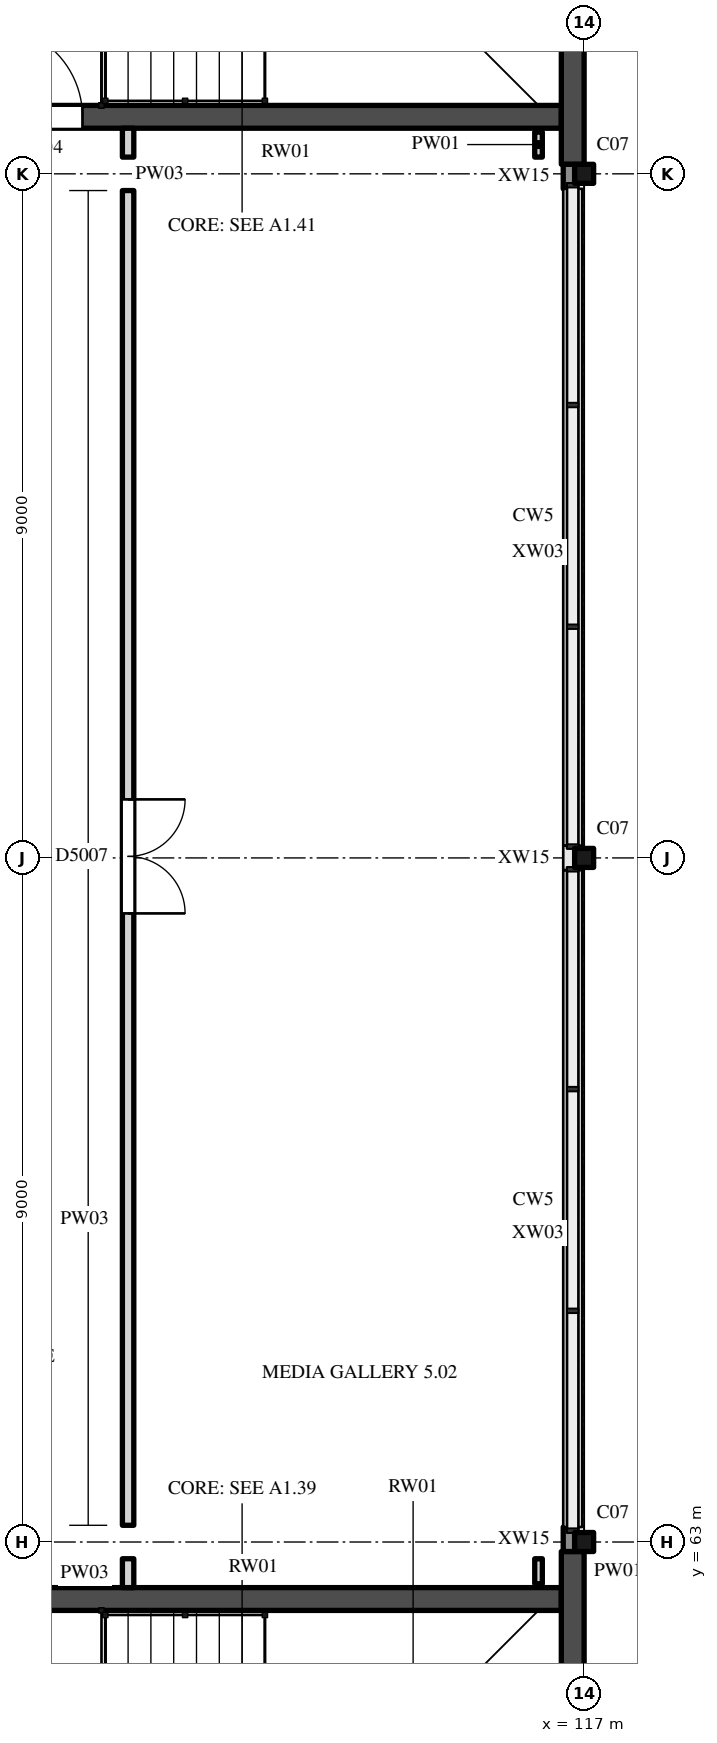
"""IFC4 building model, lengths in metres.
Left out: names, types, materials, properties, quantities, classifications, styles, units other than length and angle.
Written with IfcOpenShell. Run it as: python <this file> out.ifc"""

import sys

from ifc_helpers import new_model, si_unit, direction, frame, frame_2d, origin, origin_2d, place, context, subcontext, project, spatial, rectangle, hollow_rectangle, extrude, element, fill, save


model = new_model("IFC4")
c1 = context("Model", 3, precision=1e-05, world=origin(), true_north=direction((0.0, 1.0)))
c2 = subcontext(c1, "Body", "Model", "MODEL_VIEW")
j1 = project(units=[si_unit("LENGTHUNIT", "METRE"), si_unit("PLANEANGLEUNIT", "RADIAN")], contexts=[c1])
p1 = place(None, origin())
s1 = spatial("IfcSite", under=j1, at=p1, CompositionType="ELEMENT")
p2 = place(p1, origin())
s2 = spatial("IfcBuilding", under=s1, at=p2, CompositionType="ELEMENT")
p3 = place(p2, frame((0.0, 0.0, 31.0)))
s3 = spatial("IfcBuildingStorey", under=s2, at=p3, CompositionType="ELEMENT", Elevation=31.0)
for number, where, z_axis, x_axis in (
    (1, (117.0, 63.0, 0.0), (0.0, 0.0, 1.0), (1.0, 0.0, 0.0)),
    (2, (117.0, 72.0, 0.0), (0.0, 0.0, 1.0), (1.0, 0.0, 0.0)),
    (3, (117.0, 81.0, 0.0), (0.0, 0.0, 1.0), (1.0, 0.0, 0.0)),
):
    element("IfcColumn", number, at=place(p3, frame(where, z_axis=z_axis, x_axis=x_axis)), inside=s3, PredefinedType="COLUMN", context=c2, shape_type="SweptSolid", body=[
        extrude(hollow_rectangle(XDim=0.25, YDim=0.25, WallThickness=0.009, InnerFilletRadius=0.013, OuterFilletRadius=0.022, at=origin_2d()), origin(), (0.0, 0.0, 1.0), 5.0),
    ])
p4 = place(p3, frame((108.6, 62.25, 0.0), z_axis=(0.0, 0.0, 1.0), x_axis=(1.0, 0.0, 0.0)))
e4 = element("IfcWall", 4, at=p4, inside=s3, PredefinedType="SHEAR", context=c2, shape_type="SweptSolid", body=[
    extrude(rectangle(XDim=8.1, YDim=0.3, at=frame_2d((4.05, 0.0))), origin(), (0.0, 0.0, 1.0), 5.0),
])
p5 = place(p3, frame((116.85, 54.125, 0.0), z_axis=(0.0, 0.0, 1.0), x_axis=(0.0, 1.0, 0.0)))
e5 = element("IfcWall", 5, at=p5, inside=s3, PredefinedType="SHEAR", context=c2, shape_type="SweptSolid", body=[
    extrude(rectangle(XDim=8.75, YDim=0.3, at=frame_2d((4.375, 0.0))), origin(), (0.0, 0.0, 1.0), 5.0),
])
p6 = place(p3, frame((108.6, 81.75, 0.0), z_axis=(0.0, 0.0, 1.0), x_axis=(1.0, 0.0, 0.0)))
e6 = element("IfcWall", 6, at=p6, inside=s3, PredefinedType="SHEAR", context=c2, shape_type="SweptSolid", body=[
    extrude(rectangle(XDim=8.1, YDim=0.3, at=frame_2d((4.05, 0.0))), origin(), (0.0, 0.0, 1.0), 5.0),
])
p7 = place(p6, frame((0.6, 0.0, 0.0)))
e7 = element("IfcOpeningElement", 7, at=p7, cuts=e6, PredefinedType="OPENING", context=c2, shape_type="SweptSolid", body=[
    extrude(rectangle(XDim=1.2, YDim=2.1, at=frame_2d((0.6, 1.05))), frame((0.0, 0.16, 0.0), z_axis=(0.0, -1.0, 0.0), x_axis=(1.0, 0.0, 0.0)), (0.0, 0.0, 1.0), 0.32),
])
p8 = place(p3, frame((116.85, 81.125, 0.0), z_axis=(0.0, 0.0, 1.0), x_axis=(0.0, 1.0, 0.0)))
e8 = element("IfcWall", 8, at=p8, inside=s3, PredefinedType="SHEAR", context=c2, shape_type="SweptSolid", body=[
    extrude(rectangle(XDim=8.711, YDim=0.3, at=frame_2d((4.356, 0.0))), origin(), (0.0, 0.0, 1.0), 5.0),
])
for number, where, z_axis, x_axis in (
    (9, (116.85, 63.197, 0.0), (0.0, 0.0, 1.0), (0.0, 1.0, 0.0)),
    (10, (116.85, 72.161, 0.0), (0.0, 0.0, 1.0), (0.0, 1.0, 0.0)),
):
    element("IfcWall", number, at=place(p3, frame(where, z_axis=z_axis, x_axis=x_axis)), inside=s3, PredefinedType="SOLIDWALL", context=c2, shape_type="SweptSolid", body=[
        extrude(rectangle(XDim=8.642, YDim=0.25, at=frame_2d((4.321, 0.0))), origin(), (0.0, 0.0, 1.0), 1.1),
    ])
p9 = place(p3, frame((116.8, 62.875, 0.0), z_axis=(0.0, 0.0, 1.0), x_axis=(0.0, 1.0, 0.0)))
e11 = element("IfcWall", 11, at=p9, inside=s3, PredefinedType="SOLIDWALL", context=c2, shape_type="SweptSolid", body=[
    extrude(rectangle(XDim=0.322, YDim=0.15, at=frame_2d((0.161, 0.0))), origin(), (0.0, 0.0, 1.0), 5.0),
])
p10 = place(p3, frame((116.8, 71.839, 0.0), z_axis=(0.0, 0.0, 1.0), x_axis=(0.0, 1.0, 0.0)))
e12 = element("IfcWall", 12, at=p10, inside=s3, PredefinedType="SOLIDWALL", context=c2, shape_type="SweptSolid", body=[
    extrude(rectangle(XDim=0.322, YDim=0.15, at=frame_2d((0.161, 0.0))), origin(), (0.0, 0.0, 1.0), 1.1),
])
p11 = place(p3, frame((116.8, 80.803, 0.0), z_axis=(0.0, 0.0, 1.0), x_axis=(0.0, 1.0, 0.0)))
e13 = element("IfcWall", 13, at=p11, inside=s3, PredefinedType="SOLIDWALL", context=c2, shape_type="SweptSolid", body=[
    extrude(rectangle(XDim=0.322, YDim=0.15, at=frame_2d((0.161, 0.0))), origin(), (0.0, 0.0, 1.0), 5.0),
])
p12 = place(p2, frame((0.0, 0.0, 16.0)))
s4 = spatial("IfcBuildingStorey", under=s2, at=p12, CompositionType="ELEMENT", Elevation=16.0)
p13 = place(p12, frame((117.15, 63.0, 16.0), z_axis=(0.0, 0.0, 1.0), x_axis=(1.0, 0.0, 0.0)))
e14 = element("IfcWall", 14, at=p13, inside=s4, PredefinedType="SOLIDWALL", context=c2, shape_type="SweptSolid", body=[
    extrude(rectangle(XDim=53.7, YDim=0.3, at=frame_2d((26.85, 0.0))), origin(), (0.0, 0.0, 1.0), 0.9),
])
p14 = place(p13, frame((0.15, 0.0, 0.15)))
e15 = element("IfcOpeningElement", 15, at=p14, cuts=e14, PredefinedType="OPENING", context=c2, shape_type="SweptSolid", body=[
    extrude(rectangle(XDim=2.4, YDim=0.6, at=frame_2d((1.2, 0.3))), frame((0.0, 0.16, 0.0), z_axis=(0.0, -1.0, 0.0), x_axis=(1.0, 0.0, 0.0)), (0.0, 0.0, 1.0), 0.32),
])
p15 = place(p13, frame((3.15, 0.0, 0.15)))
e16 = element("IfcOpeningElement", 16, at=p15, cuts=e14, PredefinedType="OPENING", context=c2, shape_type="SweptSolid", body=[
    extrude(rectangle(XDim=2.4, YDim=0.6, at=frame_2d((1.2, 0.3))), frame((0.0, 0.16, 0.0), z_axis=(0.0, -1.0, 0.0), x_axis=(1.0, 0.0, 0.0)), (0.0, 0.0, 1.0), 0.32),
])
p16 = place(p13, frame((6.15, 0.0, 0.15)))
e17 = element("IfcOpeningElement", 17, at=p16, cuts=e14, PredefinedType="OPENING", context=c2, shape_type="SweptSolid", body=[
    extrude(rectangle(XDim=2.4, YDim=0.6, at=frame_2d((1.2, 0.3))), frame((0.0, 0.16, 0.0), z_axis=(0.0, -1.0, 0.0), x_axis=(1.0, 0.0, 0.0)), (0.0, 0.0, 1.0), 0.32),
])
p17 = place(p13, frame((9.15, 0.0, 0.15)))
e18 = element("IfcOpeningElement", 18, at=p17, cuts=e14, PredefinedType="OPENING", context=c2, shape_type="SweptSolid", body=[
    extrude(rectangle(XDim=2.4, YDim=0.6, at=frame_2d((1.2, 0.3))), frame((0.0, 0.16, 0.0), z_axis=(0.0, -1.0, 0.0), x_axis=(1.0, 0.0, 0.0)), (0.0, 0.0, 1.0), 0.32),
])
p18 = place(p13, frame((12.15, 0.0, 0.15)))
e19 = element("IfcOpeningElement", 19, at=p18, cuts=e14, PredefinedType="OPENING", context=c2, shape_type="SweptSolid", body=[
    extrude(rectangle(XDim=2.4, YDim=0.6, at=frame_2d((1.2, 0.3))), frame((0.0, 0.16, 0.0), z_axis=(0.0, -1.0, 0.0), x_axis=(1.0, 0.0, 0.0)), (0.0, 0.0, 1.0), 0.32),
])
p19 = place(p13, frame((15.15, 0.0, 0.15)))
e20 = element("IfcOpeningElement", 20, at=p19, cuts=e14, PredefinedType="OPENING", context=c2, shape_type="SweptSolid", body=[
    extrude(rectangle(XDim=2.4, YDim=0.6, at=frame_2d((1.2, 0.3))), frame((0.0, 0.16, 0.0), z_axis=(0.0, -1.0, 0.0), x_axis=(1.0, 0.0, 0.0)), (0.0, 0.0, 1.0), 0.32),
])
p20 = place(p13, frame((18.15, 0.0, 0.15)))
e21 = element("IfcOpeningElement", 21, at=p20, cuts=e14, PredefinedType="OPENING", context=c2, shape_type="SweptSolid", body=[
    extrude(rectangle(XDim=2.4, YDim=0.6, at=frame_2d((1.2, 0.3))), frame((0.0, 0.16, 0.0), z_axis=(0.0, -1.0, 0.0), x_axis=(1.0, 0.0, 0.0)), (0.0, 0.0, 1.0), 0.32),
])
p21 = place(p13, frame((21.15, 0.0, 0.15)))
e22 = element("IfcOpeningElement", 22, at=p21, cuts=e14, PredefinedType="OPENING", context=c2, shape_type="SweptSolid", body=[
    extrude(rectangle(XDim=2.4, YDim=0.6, at=frame_2d((1.2, 0.3))), frame((0.0, 0.16, 0.0), z_axis=(0.0, -1.0, 0.0), x_axis=(1.0, 0.0, 0.0)), (0.0, 0.0, 1.0), 0.32),
])
p22 = place(p13, frame((24.15, 0.0, 0.15)))
e23 = element("IfcOpeningElement", 23, at=p22, cuts=e14, PredefinedType="OPENING", context=c2, shape_type="SweptSolid", body=[
    extrude(rectangle(XDim=2.4, YDim=0.6, at=frame_2d((1.2, 0.3))), frame((0.0, 0.16, 0.0), z_axis=(0.0, -1.0, 0.0), x_axis=(1.0, 0.0, 0.0)), (0.0, 0.0, 1.0), 0.32),
])
p23 = place(p13, frame((27.15, 0.0, 0.15)))
e24 = element("IfcOpeningElement", 24, at=p23, cuts=e14, PredefinedType="OPENING", context=c2, shape_type="SweptSolid", body=[
    extrude(rectangle(XDim=2.4, YDim=0.6, at=frame_2d((1.2, 0.3))), frame((0.0, 0.16, 0.0), z_axis=(0.0, -1.0, 0.0), x_axis=(1.0, 0.0, 0.0)), (0.0, 0.0, 1.0), 0.32),
])
p24 = place(p13, frame((30.15, 0.0, 0.15)))
e25 = element("IfcOpeningElement", 25, at=p24, cuts=e14, PredefinedType="OPENING", context=c2, shape_type="SweptSolid", body=[
    extrude(rectangle(XDim=2.4, YDim=0.6, at=frame_2d((1.2, 0.3))), frame((0.0, 0.16, 0.0), z_axis=(0.0, -1.0, 0.0), x_axis=(1.0, 0.0, 0.0)), (0.0, 0.0, 1.0), 0.32),
])
p25 = place(p13, frame((33.15, 0.0, 0.15)))
e26 = element("IfcOpeningElement", 26, at=p25, cuts=e14, PredefinedType="OPENING", context=c2, shape_type="SweptSolid", body=[
    extrude(rectangle(XDim=2.4, YDim=0.6, at=frame_2d((1.2, 0.3))), frame((0.0, 0.16, 0.0), z_axis=(0.0, -1.0, 0.0), x_axis=(1.0, 0.0, 0.0)), (0.0, 0.0, 1.0), 0.32),
])
p26 = place(p13, frame((36.15, 0.0, 0.15)))
e27 = element("IfcOpeningElement", 27, at=p26, cuts=e14, PredefinedType="OPENING", context=c2, shape_type="SweptSolid", body=[
    extrude(rectangle(XDim=2.4, YDim=0.6, at=frame_2d((1.2, 0.3))), frame((0.0, 0.16, 0.0), z_axis=(0.0, -1.0, 0.0), x_axis=(1.0, 0.0, 0.0)), (0.0, 0.0, 1.0), 0.32),
])
p27 = place(p13, frame((39.15, 0.0, 0.15)))
e28 = element("IfcOpeningElement", 28, at=p27, cuts=e14, PredefinedType="OPENING", context=c2, shape_type="SweptSolid", body=[
    extrude(rectangle(XDim=2.4, YDim=0.6, at=frame_2d((1.2, 0.3))), frame((0.0, 0.16, 0.0), z_axis=(0.0, -1.0, 0.0), x_axis=(1.0, 0.0, 0.0)), (0.0, 0.0, 1.0), 0.32),
])
p28 = place(p13, frame((42.15, 0.0, 0.15)))
e29 = element("IfcOpeningElement", 29, at=p28, cuts=e14, PredefinedType="OPENING", context=c2, shape_type="SweptSolid", body=[
    extrude(rectangle(XDim=2.4, YDim=0.6, at=frame_2d((1.2, 0.3))), frame((0.0, 0.16, 0.0), z_axis=(0.0, -1.0, 0.0), x_axis=(1.0, 0.0, 0.0)), (0.0, 0.0, 1.0), 0.32),
])
p29 = place(p13, frame((45.15, 0.0, 0.15)))
e30 = element("IfcOpeningElement", 30, at=p29, cuts=e14, PredefinedType="OPENING", context=c2, shape_type="SweptSolid", body=[
    extrude(rectangle(XDim=2.4, YDim=0.6, at=frame_2d((1.2, 0.3))), frame((0.0, 0.16, 0.0), z_axis=(0.0, -1.0, 0.0), x_axis=(1.0, 0.0, 0.0)), (0.0, 0.0, 1.0), 0.32),
])
p30 = place(p13, frame((48.15, 0.0, 0.15)))
e31 = element("IfcOpeningElement", 31, at=p30, cuts=e14, PredefinedType="OPENING", context=c2, shape_type="SweptSolid", body=[
    extrude(rectangle(XDim=2.4, YDim=0.6, at=frame_2d((1.2, 0.3))), frame((0.0, 0.16, 0.0), z_axis=(0.0, -1.0, 0.0), x_axis=(1.0, 0.0, 0.0)), (0.0, 0.0, 1.0), 0.32),
])
p31 = place(p13, frame((51.15, 0.0, 0.15)))
e32 = element("IfcOpeningElement", 32, at=p31, cuts=e14, PredefinedType="OPENING", context=c2, shape_type="SweptSolid", body=[
    extrude(rectangle(XDim=2.4, YDim=0.6, at=frame_2d((1.2, 0.3))), frame((0.0, 0.16, 0.0), z_axis=(0.0, -1.0, 0.0), x_axis=(1.0, 0.0, 0.0)), (0.0, 0.0, 1.0), 0.32),
])
p32 = place(p12, frame((117.15, 81.0, 16.0), z_axis=(0.0, 0.0, 1.0), x_axis=(1.0, 0.0, 0.0)))
e33 = element("IfcWall", 33, at=p32, inside=s4, PredefinedType="SOLIDWALL", context=c2, shape_type="SweptSolid", body=[
    extrude(rectangle(XDim=53.7, YDim=0.3, at=frame_2d((26.85, 0.0))), origin(), (0.0, 0.0, 1.0), 0.9),
])
p33 = place(p32, frame((0.15, 0.0, 0.15)))
e34 = element("IfcOpeningElement", 34, at=p33, cuts=e33, PredefinedType="OPENING", context=c2, shape_type="SweptSolid", body=[
    extrude(rectangle(XDim=2.4, YDim=0.6, at=frame_2d((1.2, 0.3))), frame((0.0, 0.16, 0.0), z_axis=(0.0, -1.0, 0.0), x_axis=(1.0, 0.0, 0.0)), (0.0, 0.0, 1.0), 0.32),
])
p34 = place(p32, frame((3.15, 0.0, 0.15)))
e35 = element("IfcOpeningElement", 35, at=p34, cuts=e33, PredefinedType="OPENING", context=c2, shape_type="SweptSolid", body=[
    extrude(rectangle(XDim=2.4, YDim=0.6, at=frame_2d((1.2, 0.3))), frame((0.0, 0.16, 0.0), z_axis=(0.0, -1.0, 0.0), x_axis=(1.0, 0.0, 0.0)), (0.0, 0.0, 1.0), 0.32),
])
p35 = place(p32, frame((6.15, 0.0, 0.15)))
e36 = element("IfcOpeningElement", 36, at=p35, cuts=e33, PredefinedType="OPENING", context=c2, shape_type="SweptSolid", body=[
    extrude(rectangle(XDim=2.4, YDim=0.6, at=frame_2d((1.2, 0.3))), frame((0.0, 0.16, 0.0), z_axis=(0.0, -1.0, 0.0), x_axis=(1.0, 0.0, 0.0)), (0.0, 0.0, 1.0), 0.32),
])
p36 = place(p32, frame((9.15, 0.0, 0.15)))
e37 = element("IfcOpeningElement", 37, at=p36, cuts=e33, PredefinedType="OPENING", context=c2, shape_type="SweptSolid", body=[
    extrude(rectangle(XDim=2.4, YDim=0.6, at=frame_2d((1.2, 0.3))), frame((0.0, 0.16, 0.0), z_axis=(0.0, -1.0, 0.0), x_axis=(1.0, 0.0, 0.0)), (0.0, 0.0, 1.0), 0.32),
])
p37 = place(p32, frame((12.15, 0.0, 0.15)))
e38 = element("IfcOpeningElement", 38, at=p37, cuts=e33, PredefinedType="OPENING", context=c2, shape_type="SweptSolid", body=[
    extrude(rectangle(XDim=2.4, YDim=0.6, at=frame_2d((1.2, 0.3))), frame((0.0, 0.16, 0.0), z_axis=(0.0, -1.0, 0.0), x_axis=(1.0, 0.0, 0.0)), (0.0, 0.0, 1.0), 0.32),
])
p38 = place(p32, frame((15.15, 0.0, 0.15)))
e39 = element("IfcOpeningElement", 39, at=p38, cuts=e33, PredefinedType="OPENING", context=c2, shape_type="SweptSolid", body=[
    extrude(rectangle(XDim=2.4, YDim=0.6, at=frame_2d((1.2, 0.3))), frame((0.0, 0.16, 0.0), z_axis=(0.0, -1.0, 0.0), x_axis=(1.0, 0.0, 0.0)), (0.0, 0.0, 1.0), 0.32),
])
p39 = place(p32, frame((18.15, 0.0, 0.15)))
e40 = element("IfcOpeningElement", 40, at=p39, cuts=e33, PredefinedType="OPENING", context=c2, shape_type="SweptSolid", body=[
    extrude(rectangle(XDim=2.4, YDim=0.6, at=frame_2d((1.2, 0.3))), frame((0.0, 0.16, 0.0), z_axis=(0.0, -1.0, 0.0), x_axis=(1.0, 0.0, 0.0)), (0.0, 0.0, 1.0), 0.32),
])
p40 = place(p32, frame((21.15, 0.0, 0.15)))
e41 = element("IfcOpeningElement", 41, at=p40, cuts=e33, PredefinedType="OPENING", context=c2, shape_type="SweptSolid", body=[
    extrude(rectangle(XDim=2.4, YDim=0.6, at=frame_2d((1.2, 0.3))), frame((0.0, 0.16, 0.0), z_axis=(0.0, -1.0, 0.0), x_axis=(1.0, 0.0, 0.0)), (0.0, 0.0, 1.0), 0.32),
])
p41 = place(p32, frame((24.15, 0.0, 0.15)))
e42 = element("IfcOpeningElement", 42, at=p41, cuts=e33, PredefinedType="OPENING", context=c2, shape_type="SweptSolid", body=[
    extrude(rectangle(XDim=2.4, YDim=0.6, at=frame_2d((1.2, 0.3))), frame((0.0, 0.16, 0.0), z_axis=(0.0, -1.0, 0.0), x_axis=(1.0, 0.0, 0.0)), (0.0, 0.0, 1.0), 0.32),
])
p42 = place(p32, frame((27.15, 0.0, 0.15)))
e43 = element("IfcOpeningElement", 43, at=p42, cuts=e33, PredefinedType="OPENING", context=c2, shape_type="SweptSolid", body=[
    extrude(rectangle(XDim=2.4, YDim=0.6, at=frame_2d((1.2, 0.3))), frame((0.0, 0.16, 0.0), z_axis=(0.0, -1.0, 0.0), x_axis=(1.0, 0.0, 0.0)), (0.0, 0.0, 1.0), 0.32),
])
p43 = place(p32, frame((30.15, 0.0, 0.15)))
e44 = element("IfcOpeningElement", 44, at=p43, cuts=e33, PredefinedType="OPENING", context=c2, shape_type="SweptSolid", body=[
    extrude(rectangle(XDim=2.4, YDim=0.6, at=frame_2d((1.2, 0.3))), frame((0.0, 0.16, 0.0), z_axis=(0.0, -1.0, 0.0), x_axis=(1.0, 0.0, 0.0)), (0.0, 0.0, 1.0), 0.32),
])
p44 = place(p32, frame((33.15, 0.0, 0.15)))
e45 = element("IfcOpeningElement", 45, at=p44, cuts=e33, PredefinedType="OPENING", context=c2, shape_type="SweptSolid", body=[
    extrude(rectangle(XDim=2.4, YDim=0.6, at=frame_2d((1.2, 0.3))), frame((0.0, 0.16, 0.0), z_axis=(0.0, -1.0, 0.0), x_axis=(1.0, 0.0, 0.0)), (0.0, 0.0, 1.0), 0.32),
])
p45 = place(p32, frame((36.15, 0.0, 0.15)))
e46 = element("IfcOpeningElement", 46, at=p45, cuts=e33, PredefinedType="OPENING", context=c2, shape_type="SweptSolid", body=[
    extrude(rectangle(XDim=2.4, YDim=0.6, at=frame_2d((1.2, 0.3))), frame((0.0, 0.16, 0.0), z_axis=(0.0, -1.0, 0.0), x_axis=(1.0, 0.0, 0.0)), (0.0, 0.0, 1.0), 0.32),
])
p46 = place(p32, frame((39.15, 0.0, 0.15)))
e47 = element("IfcOpeningElement", 47, at=p46, cuts=e33, PredefinedType="OPENING", context=c2, shape_type="SweptSolid", body=[
    extrude(rectangle(XDim=2.4, YDim=0.6, at=frame_2d((1.2, 0.3))), frame((0.0, 0.16, 0.0), z_axis=(0.0, -1.0, 0.0), x_axis=(1.0, 0.0, 0.0)), (0.0, 0.0, 1.0), 0.32),
])
p47 = place(p32, frame((42.15, 0.0, 0.15)))
e48 = element("IfcOpeningElement", 48, at=p47, cuts=e33, PredefinedType="OPENING", context=c2, shape_type="SweptSolid", body=[
    extrude(rectangle(XDim=2.4, YDim=0.6, at=frame_2d((1.2, 0.3))), frame((0.0, 0.16, 0.0), z_axis=(0.0, -1.0, 0.0), x_axis=(1.0, 0.0, 0.0)), (0.0, 0.0, 1.0), 0.32),
])
p48 = place(p32, frame((45.15, 0.0, 0.15)))
e49 = element("IfcOpeningElement", 49, at=p48, cuts=e33, PredefinedType="OPENING", context=c2, shape_type="SweptSolid", body=[
    extrude(rectangle(XDim=2.4, YDim=0.6, at=frame_2d((1.2, 0.3))), frame((0.0, 0.16, 0.0), z_axis=(0.0, -1.0, 0.0), x_axis=(1.0, 0.0, 0.0)), (0.0, 0.0, 1.0), 0.32),
])
p49 = place(p32, frame((48.15, 0.0, 0.15)))
e50 = element("IfcOpeningElement", 50, at=p49, cuts=e33, PredefinedType="OPENING", context=c2, shape_type="SweptSolid", body=[
    extrude(rectangle(XDim=2.4, YDim=0.6, at=frame_2d((1.2, 0.3))), frame((0.0, 0.16, 0.0), z_axis=(0.0, -1.0, 0.0), x_axis=(1.0, 0.0, 0.0)), (0.0, 0.0, 1.0), 0.32),
])
p50 = place(p32, frame((51.15, 0.0, 0.15)))
e51 = element("IfcOpeningElement", 51, at=p50, cuts=e33, PredefinedType="OPENING", context=c2, shape_type="SweptSolid", body=[
    extrude(rectangle(XDim=2.4, YDim=0.6, at=frame_2d((1.2, 0.3))), frame((0.0, 0.16, 0.0), z_axis=(0.0, -1.0, 0.0), x_axis=(1.0, 0.0, 0.0)), (0.0, 0.0, 1.0), 0.32),
])
p51 = place(p3, frame((111.0, 62.4, 0.0), z_axis=(0.0, 0.0, 1.0), x_axis=(0.0, 1.0, 0.0)))
e52 = element("IfcWall", 52, at=p51, inside=s3, PredefinedType="PARTITIONING", context=c2, shape_type="SweptSolid", body=[
    extrude(rectangle(XDim=0.38, YDim=0.15, at=frame_2d((0.19, 0.0))), origin(), (0.0, 0.0, 1.0), 4.825),
])
p52 = place(p3, frame((111.0, 63.22, 0.0), z_axis=(0.0, 0.0, 1.0), x_axis=(0.0, 1.0, 0.0)))
e53 = element("IfcWall", 53, at=p52, inside=s3, PredefinedType="PARTITIONING", context=c2, shape_type="SweptSolid", body=[
    extrude(rectangle(XDim=17.56, YDim=0.15, at=frame_2d((8.78, 0.0))), origin(), (0.0, 0.0, 1.0), 4.825),
])
p53 = place(p52, frame((8.05, 0.0, 0.0)))
e54 = element("IfcOpeningElement", 54, at=p53, cuts=e53, PredefinedType="OPENING", context=c2, shape_type="SweptSolid", body=[
    extrude(rectangle(XDim=1.5, YDim=2.4, at=frame_2d((0.75, 1.2))), frame((0.0, 0.085, 0.0), z_axis=(0.0, -1.0, 0.0), x_axis=(1.0, 0.0, 0.0)), (0.0, 0.0, 1.0), 0.17),
])
p54 = place(p3, frame((111.0, 81.22, 0.0), z_axis=(0.0, 0.0, 1.0), x_axis=(0.0, 1.0, 0.0)))
e55 = element("IfcWall", 55, at=p54, inside=s3, PredefinedType="PARTITIONING", context=c2, shape_type="SweptSolid", body=[
    extrude(rectangle(XDim=0.38, YDim=0.15, at=frame_2d((0.19, 0.0))), origin(), (0.0, 0.0, 1.0), 4.825),
])
for number, where, z_axis, x_axis in (
    (56, (116.4, 62.45, 0.0), (0.0, 0.0, 1.0), (0.0, 1.0, 0.0)),
    (57, (116.4, 81.22, 0.0), (0.0, 0.0, 1.0), (0.0, 1.0, 0.0)),
):
    element("IfcWall", number, at=place(p3, frame(where, z_axis=z_axis, x_axis=x_axis)), inside=s3, PredefinedType="PARTITIONING", context=c2, shape_type="SweptSolid", body=[
        extrude(rectangle(XDim=0.33, YDim=0.1, at=frame_2d((0.165, 0.0))), origin(), (0.0, 0.0, 1.0), 4.825),
    ])
p55 = place(p7, origin())
e58 = element("IfcDoor", 58, at=p55, inside=s3, OperationType="SINGLE_SWING_RIGHT", PredefinedType="DOOR", context=c2, shape_type="SweptSolid", body=[
    extrude(rectangle(XDim=1.2, YDim=2.1, at=frame_2d((0.6, 1.05))), frame((0.0, 0.025, 0.0), z_axis=(0.0, -1.0, 0.0), x_axis=(1.0, 0.0, 0.0)), (0.0, 0.0, 1.0), 0.05),
])
fill(e7, e58)
p56 = place(p53, origin())
e59 = element("IfcDoor", 59, at=p56, inside=s3, OperationType="DOUBLE_DOOR_SINGLE_SWING", PredefinedType="DOOR", context=c2, shape_type="SweptSolid", body=[
    extrude(rectangle(XDim=1.5, YDim=2.4, at=frame_2d((0.75, 1.2))), frame((0.0, 0.025, 0.0), z_axis=(0.0, -1.0, 0.0), x_axis=(1.0, 0.0, 0.0)), (0.0, 0.0, 1.0), 0.05),
])
fill(e54, e59)
save(model, sys.argv[1])
